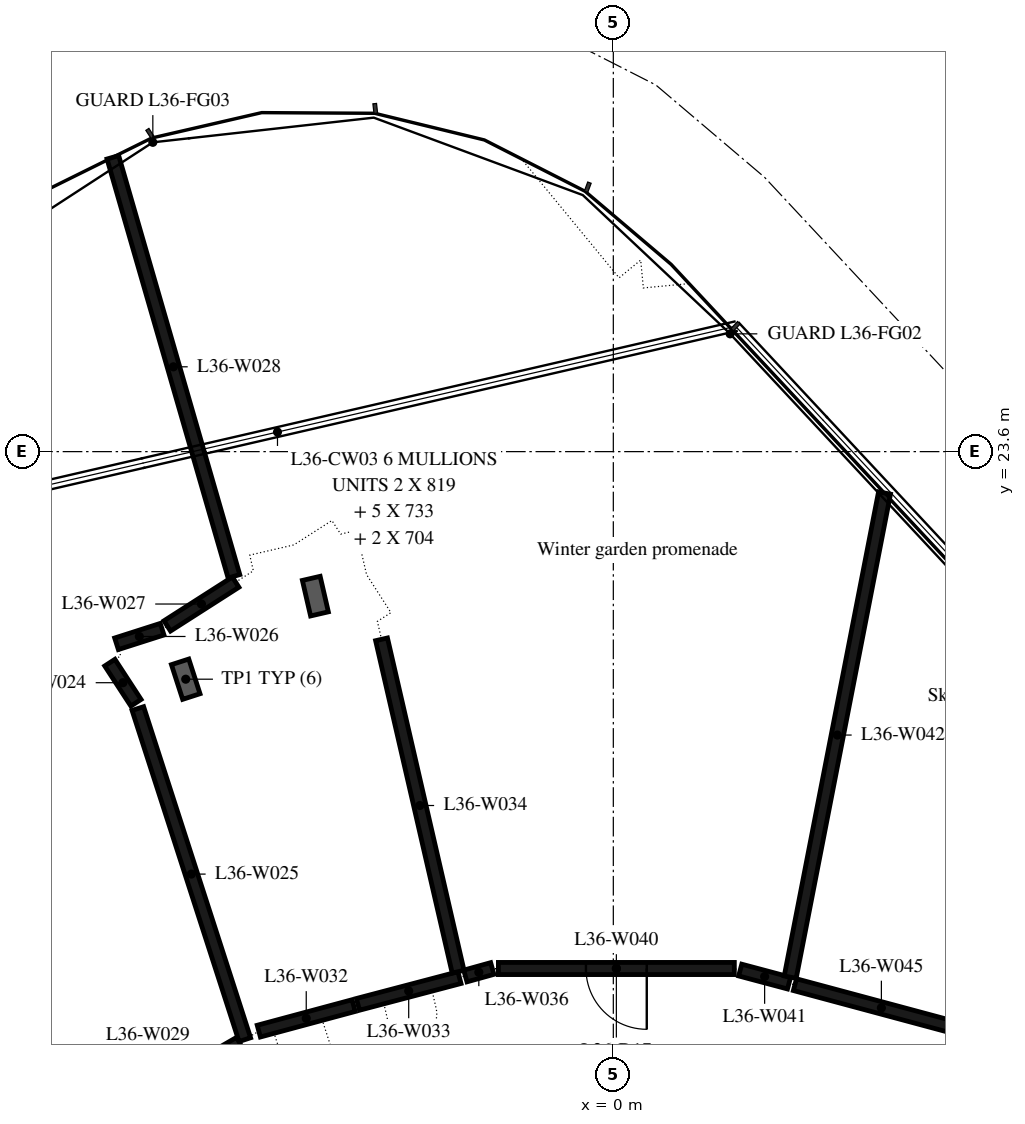
"""IFC4 building model, lengths in metres.
Left out: names, types, materials, properties, quantities, classifications, styles, units other than length and angle.
Written with IfcOpenShell. Run it as: python <this file> out.ifc"""

import sys

from ifc_helpers import new_model, si_unit, direction, frame, frame_2d, origin, place, context, subcontext, project, spatial, rectangle, extrude, element, fill, save


model = new_model("IFC4")
c1 = context("Model", 3, precision=1e-05, world=origin(), true_north=direction((0.0, 1.0)))
c2 = subcontext(c1, "Body", "Model", "MODEL_VIEW")
j1 = project(units=[si_unit("LENGTHUNIT", "METRE"), si_unit("PLANEANGLEUNIT", "RADIAN")], contexts=[c1])
p1 = place(None, origin())
s1 = spatial("IfcSite", under=j1, at=p1, CompositionType="ELEMENT")
p2 = place(p1, origin())
s2 = spatial("IfcBuilding", under=s1, at=p2, CompositionType="ELEMENT")
p3 = place(p2, frame((0.0, 0.0, 144.9)))
s3 = spatial("IfcBuildingStorey", under=s2, at=p3, CompositionType="ELEMENT", Elevation=144.9)
p4 = place(p3, frame((-9.27, 12.08, 0.0), z_axis=(0.0, 0.0, 1.0), x_axis=(-0.608983097201, 0.793183199093, 0.0)))
e1 = element("IfcWall", 1, at=p4, inside=s3, PredefinedType="PARTITIONING", context=c2, shape_type="SweptSolid", body=[
    extrude(rectangle(XDim=7.98, YDim=0.25, at=frame_2d((3.99, 0.0))), origin(), (0.0, 0.0, 1.0), 6.35),
])
p5 = place(p3, frame((-8.28, 20.13, 0.0), z_axis=(0.0, 0.0, 1.0), x_axis=(0.545870586018, -0.83786950256, 0.0)))
e2 = element("IfcWall", 2, at=p5, inside=s3, PredefinedType="PARTITIONING", context=c2, shape_type="SweptSolid", body=[
    extrude(rectangle(XDim=0.788, YDim=0.2, at=frame_2d((0.394, 0.0))), origin(), (0.0, 0.0, 1.0), 6.35),
])
p6 = place(p3, frame((-7.819, 19.375, 0.0), z_axis=(0.0, 0.0, 1.0), x_axis=(0.307459013015, -0.951561325042, 0.0)))
e3 = element("IfcWall", 3, at=p6, inside=s3, PredefinedType="PARTITIONING", context=c2, shape_type="SweptSolid", body=[
    extrude(rectangle(XDim=5.722, YDim=0.2, at=frame_2d((2.861, 0.0))), origin(), (0.0, 0.0, 1.0), 6.35),
])
p7 = place(p3, frame((-7.42, 20.68, 0.0), z_axis=(0.0, 0.0, 1.0), x_axis=(-0.95242774696, -0.304764477624, 0.0)))
e4 = element("IfcWall", 4, at=p7, inside=s3, PredefinedType="PARTITIONING", context=c2, shape_type="SweptSolid", body=[
    extrude(rectangle(XDim=0.787, YDim=0.2, at=frame_2d((0.394, 0.0))), origin(), (0.0, 0.0, 1.0), 6.35),
])
p8 = place(p3, frame((-7.336, 20.734, 0.0), z_axis=(0.0, 0.0, 1.0), x_axis=(0.842258116514, 0.539074452341, 0.0)))
e5 = element("IfcWall", 5, at=p8, inside=s3, PredefinedType="PARTITIONING", context=c2, shape_type="SweptSolid", body=[
    extrude(rectangle(XDim=1.335, YDim=0.2, at=frame_2d((0.667, 0.0))), origin(), (0.0, 0.0, 1.0), 6.35),
])
p9 = place(p3, frame((-6.239, 21.55, 0.0), z_axis=(0.0, 0.0, 1.0), x_axis=(-0.277633208202, 0.960687150795, 0.0)))
e6 = element("IfcWall", 6, at=p9, inside=s3, PredefinedType="PARTITIONING", context=c2, shape_type="SweptSolid", body=[
    extrude(rectangle(XDim=7.172, YDim=0.2, at=frame_2d((3.586, 0.0))), origin(), (0.0, 0.0, 1.0), 6.35),
])
p10 = place(p3, frame((-6.147, 13.88, 0.0), z_axis=(0.0, 0.0, 1.0), x_axis=(-0.866380576307, -0.499384317933, 0.0)))
e7 = element("IfcWall", 7, at=p10, inside=s3, PredefinedType="PARTITIONING", context=c2, shape_type="SweptSolid", body=[
    extrude(rectangle(XDim=3.48, YDim=0.2, at=frame_2d((1.74, 0.0))), origin(), (0.0, 0.0, 1.0), 6.35),
])
p11 = place(p10, frame((1.24, 0.0, 0.0)))
e8 = element("IfcOpeningElement", 8, at=p11, cuts=e7, PredefinedType="OPENING", context=c2, shape_type="SweptSolid", body=[
    extrude(rectangle(XDim=1.0, YDim=2.1, at=frame_2d((0.5, 1.05))), frame((0.0, 0.11, 0.0), z_axis=(0.0, -1.0, 0.0), x_axis=(1.0, 0.0, 0.0)), (0.0, 0.0, 1.0), 0.22),
])
p12 = place(p3, frame((-4.27, 14.49, 0.0), z_axis=(0.0, 0.0, 1.0), x_axis=(-0.965630347497, -0.259919279764, 0.0)))
e9 = element("IfcWall", 9, at=p12, inside=s3, PredefinedType="PARTITIONING", context=c2, shape_type="SweptSolid", body=[
    extrude(rectangle(XDim=1.615, YDim=0.2, at=frame_2d((0.808, 0.0))), origin(), (0.0, 0.0, 1.0), 6.35),
])
p13 = place(p3, frame((-2.53, 14.95, 0.0), z_axis=(0.0, 0.0, 1.0), x_axis=(-0.967004912384, -0.254757726918, 0.0)))
e10 = element("IfcWall", 10, at=p13, inside=s3, PredefinedType="PARTITIONING", context=c2, shape_type="SweptSolid", body=[
    extrude(rectangle(XDim=1.727, YDim=0.2, at=frame_2d((0.863, 0.0))), origin(), (0.0, 0.0, 1.0), 6.35),
])
p14 = place(p3, frame((-2.552, 15.047, 0.0), z_axis=(0.0, 0.0, 1.0), x_axis=(-0.224509812838, 0.974471828192, 0.0)))
e11 = element("IfcWall", 11, at=p14, inside=s3, PredefinedType="PARTITIONING", context=c2, shape_type="SweptSolid", body=[
    extrude(rectangle(XDim=5.609, YDim=0.2, at=frame_2d((2.804, 0.0))), origin(), (0.0, 0.0, 1.0), 6.35),
])
p15 = place(p3, frame((-1.99, 15.1, 0.0), z_axis=(0.0, 0.0, 1.0), x_axis=(-0.963479915785, -0.267780604002, 0.0)))
e12 = element("IfcWall", 12, at=p15, inside=s3, PredefinedType="PARTITIONING", context=c2, shape_type="SweptSolid", body=[
    extrude(rectangle(XDim=0.46, YDim=0.2, at=frame_2d((0.23, 0.0))), origin(), (0.0, 0.0, 1.0), 6.35),
])
p16 = place(p3, frame((1.99, 15.1, 0.0), z_axis=(0.0, 0.0, 1.0), x_axis=(-1.0, 0.0, 0.0)))
e13 = element("IfcWall", 13, at=p16, inside=s3, PredefinedType="PARTITIONING", context=c2, shape_type="SweptSolid", body=[
    extrude(rectangle(XDim=3.88, YDim=0.2, at=frame_2d((1.94, 0.0))), origin(), (0.0, 0.0, 1.0), 6.35),
])
p17 = place(p16, frame((1.44, 0.0, 0.0)))
e14 = element("IfcOpeningElement", 14, at=p17, cuts=e13, PredefinedType="OPENING", context=c2, shape_type="SweptSolid", body=[
    extrude(rectangle(XDim=1.0, YDim=2.1, at=frame_2d((0.5, 1.05))), frame((0.0, 0.11, 0.0), z_axis=(0.0, -1.0, 0.0), x_axis=(1.0, 0.0, 0.0)), (0.0, 0.0, 1.0), 0.22),
])
p18 = place(p3, frame((2.89, 14.86, 0.0), z_axis=(0.0, 0.0, 1.0), x_axis=(-0.966259308377, 0.257571250288, 0.0)))
e15 = element("IfcWall", 15, at=p18, inside=s3, PredefinedType="PARTITIONING", context=c2, shape_type="SweptSolid", body=[
    extrude(rectangle(XDim=0.831, YDim=0.2, at=frame_2d((0.416, 0.0))), origin(), (0.0, 0.0, 1.0), 6.35),
])
p19 = place(p3, frame((4.46, 22.92, 0.0), z_axis=(0.0, 0.0, 1.0), x_axis=(-0.191187868841, -0.981553462022, 0.0)))
e16 = element("IfcWall", 16, at=p19, inside=s3, PredefinedType="PARTITIONING", context=c2, shape_type="SweptSolid", body=[
    extrude(rectangle(XDim=8.111, YDim=0.2, at=frame_2d((4.056, 0.0))), origin(), (0.0, 0.0, 1.0), 6.35),
])
p20 = place(p3, frame((5.83, 14.07, 0.0), z_axis=(0.0, 0.0, 1.0), x_axis=(-0.965755722544, 0.259453048497, 0.0)))
e17 = element("IfcWall", 17, at=p20, inside=s3, PredefinedType="PARTITIONING", context=c2, shape_type="SweptSolid", body=[
    extrude(rectangle(XDim=2.944, YDim=0.2, at=frame_2d((1.472, 0.0))), origin(), (0.0, 0.0, 1.0), 6.35),
])
p21 = place(p17, origin())
e18 = element("IfcDoor", 18, at=p21, inside=s3, OperationType="SINGLE_SWING_LEFT", PredefinedType="DOOR", context=c2, shape_type="SweptSolid", body=[
    extrude(rectangle(XDim=1.0, YDim=2.1, at=frame_2d((0.5, 1.05))), frame((0.0, 0.025, 0.0), z_axis=(0.0, -1.0, 0.0), x_axis=(1.0, 0.0, 0.0)), (0.0, 0.0, 1.0), 0.05),
])
fill(e14, e18)
save(model, sys.argv[1])
